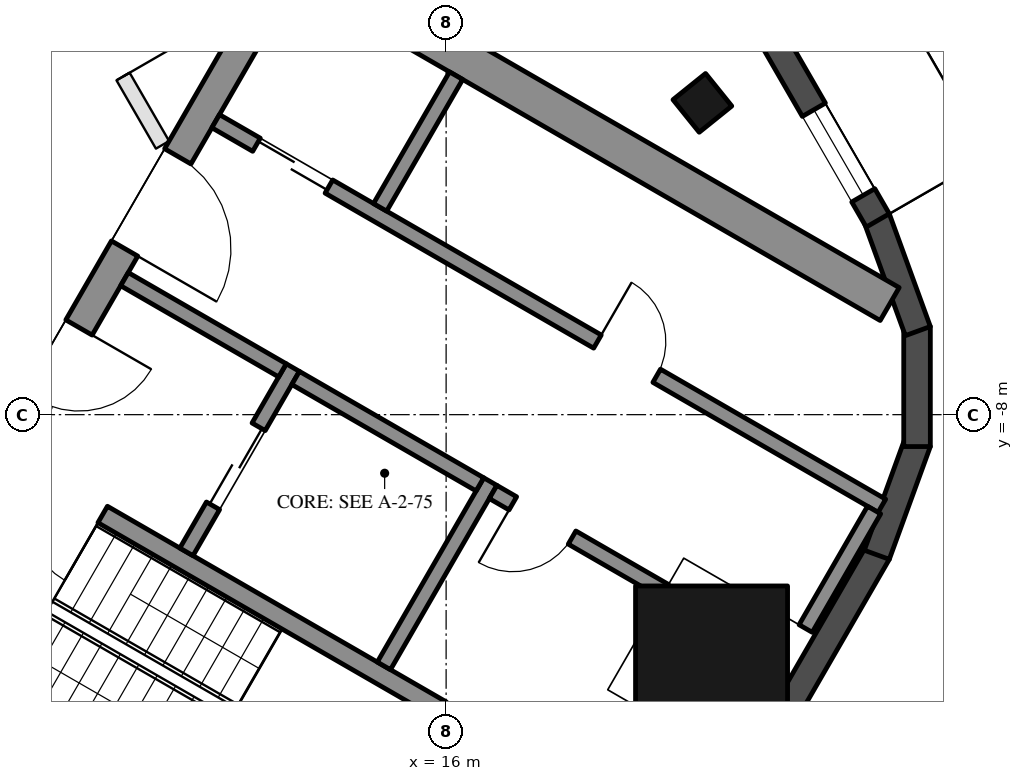
"""IFC4 building model, lengths in metres.
Left out: names, types, materials, properties, quantities, classifications, styles, units other than length and angle.
Written with IfcOpenShell. Run it as: python <this file> out.ifc"""

import sys

from ifc_helpers import new_model, si_unit, direction, frame, frame_2d, origin, origin_2d, place, context, subcontext, project, spatial, rectangle, hollow_rectangle, extrude, boolean, halfspace, element, fill, save


model = new_model("IFC4")
c1 = context("Model", 3, precision=1e-05, world=origin(), true_north=direction((0.0, 1.0)))
c2 = subcontext(c1, "Body", "Model", "MODEL_VIEW")
j1 = project(units=[si_unit("LENGTHUNIT", "METRE"), si_unit("PLANEANGLEUNIT", "RADIAN")], contexts=[c1])
p1 = place(None, origin())
s1 = spatial("IfcSite", under=j1, at=p1, CompositionType="ELEMENT")
p2 = place(p1, origin())
s2 = spatial("IfcBuilding", under=s1, at=p2, CompositionType="ELEMENT")
p3 = place(p2, frame((0.0, 0.0, 320.7)))
s3 = spatial("IfcBuildingStorey", under=s2, at=p3, CompositionType="ELEMENT", Elevation=320.7)
p4 = place(p3, frame((19.372, -3.898, 0.0), z_axis=(-0.190735471498, 0.029652697198, 0.981193506634), x_axis=(0.48820144503, -0.864299133312, 0.121022135277)))
e1 = element("IfcColumn", 1, at=p4, inside=s3, PredefinedType="COLUMN", context=c2, shape_type="SweptSolid", body=[
    boolean("DIFFERENCE", boolean("DIFFERENCE", extrude(hollow_rectangle(XDim=0.55, YDim=0.55, WallThickness=0.025, at=origin_2d()), origin(), (0.0, 0.0, 1.0), 3.771), halfspace(frame((0.0, 0.0, 0.04), z_axis=(0.0, 0.0, 1.0), x_axis=(1.0, 0.0, 0.0)), True)), halfspace(frame((0.0, 0.0, 3.731), z_axis=(0.0, 0.0, 1.0), x_axis=(1.0, 0.0, 0.0)), False)),
])
p5 = place(p3, frame((19.492, -11.254, 0.0), z_axis=(-0.190406849863, 0.109944185114, 0.975529347424), x_axis=(0.500043453909, 0.866000314205, 0.0)))
e2 = element("IfcColumn", 2, at=p5, inside=s3, PredefinedType="COLUMN", context=c2, shape_type="SweptSolid", body=[
    boolean("DIFFERENCE", boolean("DIFFERENCE", extrude(hollow_rectangle(XDim=2.0, YDim=2.0, WallThickness=0.05, at=origin_2d()), origin(), (0.0, 0.0, 1.0), 3.793), halfspace(frame((0.0, 0.0, 0.113), z_axis=(0.0, 0.0, 1.0), x_axis=(1.0, 0.0, 0.0)), True)), halfspace(frame((0.0, 0.0, 3.679), z_axis=(0.0, 0.0, 1.0), x_axis=(1.0, 0.0, 0.0)), False)),
])
p6 = place(p3, frame((19.34, -13.867, 0.0), z_axis=(0.0, 0.0, 1.0), x_axis=(0.500023656998, 0.86601174498, 0.0)))
e3 = element("IfcWall", 3, at=p6, inside=s3, PredefinedType="SOLIDWALL", context=c2, shape_type="SweptSolid", body=[
    extrude(rectangle(XDim=4.677, YDim=0.35, at=frame_2d((2.339, 0.0))), origin(), (0.0, 0.0, 1.0), 3.55),
])
for number, where, z_axis, x_axis in (
    (4, (21.666, -9.844, 0.0), (0.0, 0.0, 1.0), (0.342, 0.94, 0.0)),
    (5, (22.196, -8.42, 0.0), (0.0, 0.0, 1.0), (0.0, 1.0, 0.0)),
    (6, (22.206, -6.9, 0.0), (0.0, 0.0, 1.0), (-0.342, 0.94, 0.0)),
):
    element("IfcWall", number, at=place(p3, frame(where, z_axis=z_axis, x_axis=x_axis)), inside=s3, PredefinedType="SOLIDWALL", context=c2, shape_type="SweptSolid", body=[
        extrude(rectangle(XDim=1.579, YDim=0.35, at=frame_2d((0.79, 0.0))), origin(), (0.0, 0.0, 1.0), 3.55),
    ])
p7 = place(p3, frame((21.679, -5.444, 0.0), z_axis=(0.0, 0.0, 1.0), x_axis=(-0.500020587865, 0.866013517049, 0.0)))
e7 = element("IfcWall", 7, at=p7, inside=s3, PredefinedType="SOLIDWALL", context=c2, shape_type="SweptSolid", body=[
    extrude(rectangle(XDim=9.924, YDim=0.35, at=frame_2d((4.962, 0.0))), origin(), (0.0, 0.0, 1.0), 3.55),
])
p8 = place(p7, frame((0.381, 0.0, 0.3)))
e8 = element("IfcOpeningElement", 8, at=p8, cuts=e7, PredefinedType="OPENING", context=c2, shape_type="SweptSolid", body=[
    extrude(rectangle(XDim=1.3, YDim=2.65, at=frame_2d((0.65, 1.325))), frame((0.0, 0.185, 0.0), z_axis=(0.0, -1.0, 0.0), x_axis=(1.0, 0.0, 0.0)), (0.0, 0.0, 1.0), 0.37),
])
p9 = place(p7, frame((5.995, 0.0, 0.0)))
e9 = element("IfcOpeningElement", 9, at=p9, cuts=e7, PredefinedType="OPENING", context=c2, shape_type="SweptSolid", body=[
    extrude(rectangle(XDim=2.4, YDim=2.4, at=frame_2d((1.2, 1.2))), frame((0.0, 0.185, 0.0), z_axis=(0.0, -1.0, 0.0), x_axis=(1.0, 0.0, 0.0)), (0.0, 0.0, 1.0), 0.37),
])
p10 = place(p7, frame((3.579, 0.0, 0.3)))
e10 = element("IfcOpeningElement", 10, at=p10, cuts=e7, PredefinedType="OPENING", context=c2, shape_type="SweptSolid", body=[
    extrude(rectangle(XDim=2.1, YDim=2.65, at=frame_2d((1.05, 1.325))), frame((0.0, 0.185, 0.0), z_axis=(0.0, -1.0, 0.0), x_axis=(1.0, 0.0, 0.0)), (0.0, 0.0, 1.0), 0.37),
])
for number, where, z_axis, x_axis in (
    (11, (8.547, -10.997, 0.0), (0.0, 0.0, 1.0), (0.866, -0.5, 0.0)),
    (12, (13.797, -1.903, 0.0), (0.0, 0.0, 1.0), (0.866, -0.5, 0.0)),
):
    element("IfcWall", number, at=place(p3, frame(where, z_axis=z_axis, x_axis=x_axis)), inside=s3, PredefinedType="SHEAR", context=c2, shape_type="SweptSolid", body=[
        extrude(rectangle(XDim=9.283, YDim=0.5, at=frame_2d((4.641, 0.0))), origin(), (0.0, 0.0, 1.0), 3.5),
    ])
p11 = place(p3, frame((8.845, -10.88, 0.0), z_axis=(0.0, 0.0, 1.0), x_axis=(0.500004234368, 0.866022959057, 0.0)))
e13 = element("IfcWall", 13, at=p11, inside=s3, PredefinedType="SHEAR", context=c2, shape_type="SweptSolid", body=[
    extrude(rectangle(XDim=10.0, YDim=0.4, at=frame_2d((5.0, 0.0))), origin(), (0.0, 0.0, 1.0), 3.5),
])
p12 = place(p11, frame((3.55, 0.0, 0.0)))
e14 = element("IfcOpeningElement", 14, at=p12, cuts=e13, PredefinedType="OPENING", context=c2, shape_type="SweptSolid", body=[
    extrude(rectangle(XDim=1.1, YDim=2.1, at=frame_2d((0.55, 1.05))), frame((0.0, 0.21, 0.0), z_axis=(0.0, -1.0, 0.0), x_axis=(1.0, 0.0, 0.0)), (0.0, 0.0, 1.0), 0.42),
])
p13 = place(p11, frame((5.85, 0.0, 0.0)))
e15 = element("IfcOpeningElement", 15, at=p13, cuts=e13, PredefinedType="OPENING", context=c2, shape_type="SweptSolid", body=[
    extrude(rectangle(XDim=1.4, YDim=2.1, at=frame_2d((0.7, 1.05))), frame((0.0, 0.21, 0.0), z_axis=(0.0, -1.0, 0.0), x_axis=(1.0, 0.0, 0.0)), (0.0, 0.0, 1.0), 0.42),
])
p14 = place(p3, frame((10.356, -8.664, 0.0), z_axis=(0.0, 0.0, 1.0), x_axis=(0.866028629588, -0.499994412703, 0.0)))
e16 = element("IfcWall", 16, at=p14, inside=s3, PredefinedType="SHEAR", context=c2, shape_type="SweptSolid", body=[
    extrude(rectangle(XDim=6.45, YDim=0.25, at=frame_2d((3.225, 0.0))), origin(), (0.0, 0.0, 1.0), 3.5),
])
p15 = place(p14, frame((0.3, 0.0, 0.0)))
e17 = element("IfcOpeningElement", 17, at=p15, cuts=e16, PredefinedType="OPENING", context=c2, shape_type="SweptSolid", body=[
    extrude(rectangle(XDim=1.0, YDim=2.1, at=frame_2d((0.5, 1.05))), frame((0.0, 0.135, 0.0), z_axis=(0.0, -1.0, 0.0), x_axis=(1.0, 0.0, 0.0)), (0.0, 0.0, 1.0), 0.27),
])
p16 = place(p3, frame((15.181, -11.305, 0.0), z_axis=(0.0, 0.0, 1.0), x_axis=(0.49994636267, 0.866056369097, 0.0)))
e18 = element("IfcWall", 18, at=p16, inside=s3, PredefinedType="SHEAR", context=c2, shape_type="SweptSolid", body=[
    extrude(rectangle(XDim=2.8, YDim=0.2, at=frame_2d((1.4, 0.0))), origin(), (0.0, 0.0, 1.0), 3.5),
])
p17 = place(p3, frame((12.583, -9.805, 0.0), z_axis=(0.0, 0.0, 1.0), x_axis=(0.49994636267, 0.866056369097, 0.0)))
e19 = element("IfcWall", 19, at=p17, inside=s3, PredefinedType="SHEAR", context=c2, shape_type="SweptSolid", body=[
    extrude(rectangle(XDim=2.8, YDim=0.2, at=frame_2d((1.4, 0.0))), origin(), (0.0, 0.0, 1.0), 3.5),
])
p18 = place(p17, frame((0.7, 0.0, 0.0)))
e20 = element("IfcOpeningElement", 20, at=p18, cuts=e19, PredefinedType="OPENING", context=c2, shape_type="SweptSolid", body=[
    extrude(rectangle(XDim=1.2, YDim=2.1, at=frame_2d((0.6, 1.05))), frame((0.0, 0.11, 0.0), z_axis=(0.0, -1.0, 0.0), x_axis=(1.0, 0.0, 0.0)), (0.0, 0.0, 1.0), 0.22),
])
p19 = place(p3, frame((11.768, -6.217, 0.0), z_axis=(0.0, 0.0, 1.0), x_axis=(0.866050077142, -0.499957262057, 0.0)))
e21 = element("IfcWall", 21, at=p19, inside=s3, PredefinedType="SHEAR", context=c2, shape_type="SweptSolid", body=[
    extrude(rectangle(XDim=2.4, YDim=0.2, at=frame_2d((1.2, 0.0))), origin(), (0.0, 0.0, 1.0), 3.5),
])
p20 = place(p3, frame((14.02, -7.517, 0.0), z_axis=(0.0, 0.0, 1.0), x_axis=(0.866034573852, -0.49998411664, 0.0)))
e22 = element("IfcWall", 22, at=p20, inside=s3, PredefinedType="SHEAR", context=c2, shape_type="SweptSolid", body=[
    extrude(rectangle(XDim=2.8, YDim=0.2, at=frame_2d((1.4, 0.0))), origin(), (0.0, 0.0, 1.0), 3.5),
])
p21 = place(p3, frame((12.968, -4.138, 0.0), z_axis=(0.0, 0.0, 1.0), x_axis=(0.866025710499, -0.499999468754, 0.0)))
e23 = element("IfcWall", 23, at=p21, inside=s3, PredefinedType="SHEAR", context=c2, shape_type="SweptSolid", body=[
    extrude(rectangle(XDim=10.121, YDim=0.2, at=frame_2d((5.061, 0.0))), origin(), (0.0, 0.0, 1.0), 3.5),
])
p22 = place(p21, frame((0.62, 0.0, 0.0)))
e24 = element("IfcOpeningElement", 24, at=p22, cuts=e23, PredefinedType="OPENING", context=c2, shape_type="SweptSolid", body=[
    extrude(rectangle(XDim=1.1, YDim=2.1, at=frame_2d((0.55, 1.05))), frame((0.0, 0.11, 0.0), z_axis=(0.0, -1.0, 0.0), x_axis=(1.0, 0.0, 0.0)), (0.0, 0.0, 1.0), 0.22),
])
p23 = place(p21, frame((5.8, 0.0, 0.0)))
e25 = element("IfcOpeningElement", 25, at=p23, cuts=e23, PredefinedType="OPENING", context=c2, shape_type="SweptSolid", body=[
    extrude(rectangle(XDim=0.9, YDim=2.1, at=frame_2d((0.45, 1.05))), frame((0.0, 0.11, 0.0), z_axis=(0.0, -1.0, 0.0), x_axis=(1.0, 0.0, 0.0)), (0.0, 0.0, 1.0), 0.22),
])
p24 = place(p3, frame((20.73, -10.814, 0.0), z_axis=(0.0, 0.0, 1.0), x_axis=(0.499961193289, 0.866047807691, 0.0)))
e26 = element("IfcWall", 26, at=p24, inside=s3, PredefinedType="SHEAR", context=c2, shape_type="SweptSolid", body=[
    extrude(rectangle(XDim=1.8, YDim=0.2, at=frame_2d((0.9, 0.0))), origin(), (0.0, 0.0, 1.0), 3.5),
])
p25 = place(p3, frame((16.618, -9.017, 0.0), z_axis=(0.0, 0.0, 1.0), x_axis=(0.866045268016, -0.499965592563, 0.0)))
e27 = element("IfcWall", 27, at=p25, inside=s3, PredefinedType="SHEAR", context=c2, shape_type="SweptSolid", body=[
    extrude(rectangle(XDim=2.608, YDim=0.2, at=frame_2d((1.304, 0.0))), origin(), (0.0, 0.0, 1.0), 3.5),
])
p26 = place(p25, frame((0.3, 0.0, 0.0)))
e28 = element("IfcOpeningElement", 28, at=p26, cuts=e27, PredefinedType="OPENING", context=c2, shape_type="SweptSolid", body=[
    extrude(rectangle(XDim=0.9, YDim=2.1, at=frame_2d((0.45, 1.05))), frame((0.0, 0.11, 0.0), z_axis=(0.0, -1.0, 0.0), x_axis=(1.0, 0.0, 0.0)), (0.0, 0.0, 1.0), 0.22),
])
p27 = place(p3, frame((15.131, -5.272, 0.0), z_axis=(0.0, 0.0, 1.0), x_axis=(0.499972520799, 0.866041268327, 0.0)))
e29 = element("IfcWall", 29, at=p27, inside=s3, PredefinedType="SHEAR", context=c2, shape_type="SweptSolid", body=[
    extrude(rectangle(XDim=2.0, YDim=0.2, at=frame_2d((1.0, 0.0))), origin(), (0.0, 0.0, 1.0), 3.5),
])
p28 = place(p3, frame((10.025, -0.563, 0.0), z_axis=(0.0, 0.0, 1.0), x_axis=(0.500000259638, -0.866025253883, 0.0)))
e30 = element("IfcWall", 30, at=p28, inside=s3, PredefinedType="PARTITIONING", context=c2, shape_type="SweptSolid", body=[
    extrude(rectangle(XDim=4.488, YDim=0.2, at=frame_2d((2.244, 0.0))), origin(), (0.0, 0.0, 1.0), 3.15),
])
p29 = place(p28, frame((2.45, 0.0, 0.0)))
e31 = element("IfcOpeningElement", 31, at=p29, cuts=e30, PredefinedType="OPENING", context=c2, shape_type="SweptSolid", body=[
    extrude(rectangle(XDim=1.0, YDim=2.1, at=frame_2d((0.5, 1.05))), frame((0.0, 0.11, 0.0), z_axis=(0.0, -1.0, 0.0), x_axis=(1.0, 0.0, 0.0)), (0.0, 0.0, 1.0), 0.22),
])
p30 = place(p8, origin())
e32 = element("IfcWindow", 32, at=p30, inside=s3, PartitioningType="SINGLE_PANEL", PredefinedType="WINDOW", context=c2, shape_type="SweptSolid", body=[
    extrude(rectangle(XDim=1.3, YDim=2.65, at=frame_2d((0.65, 1.325))), frame((0.0, 0.03, 0.0), z_axis=(0.0, -1.0, 0.0), x_axis=(1.0, 0.0, 0.0)), (0.0, 0.0, 1.0), 0.06),
])
fill(e8, e32)
p31 = place(p18, origin())
e33 = element("IfcDoor", 33, at=p31, inside=s3, OperationType="DOUBLE_DOOR_SLIDING", PredefinedType="DOOR", context=c2, shape_type="SweptSolid", body=[
    extrude(rectangle(XDim=1.2, YDim=2.1, at=frame_2d((0.6, 1.05))), frame((0.0, 0.025, 0.0), z_axis=(0.0, -1.0, 0.0), x_axis=(1.0, 0.0, 0.0)), (0.0, 0.0, 1.0), 0.05),
])
fill(e20, e33)
p32 = place(p22, origin())
e34 = element("IfcDoor", 34, at=p32, inside=s3, OperationType="DOUBLE_DOOR_SLIDING", PredefinedType="DOOR", context=c2, shape_type="SweptSolid", body=[
    extrude(rectangle(XDim=1.1, YDim=2.1, at=frame_2d((0.55, 1.05))), frame((0.0, 0.025, 0.0), z_axis=(0.0, -1.0, 0.0), x_axis=(1.0, 0.0, 0.0)), (0.0, 0.0, 1.0), 0.05),
])
fill(e24, e34)
p33 = place(p23, origin())
e35 = element("IfcDoor", 35, at=p33, inside=s3, OperationType="SINGLE_SWING_LEFT", PredefinedType="DOOR", context=c2, shape_type="SweptSolid", body=[
    extrude(rectangle(XDim=0.9, YDim=2.1, at=frame_2d((0.45, 1.05))), frame((0.0, 0.025, 0.0), z_axis=(0.0, -1.0, 0.0), x_axis=(1.0, 0.0, 0.0)), (0.0, 0.0, 1.0), 0.05),
])
fill(e25, e35)
p34 = place(p26, frame((0.9, 0.0, 0.0), z_axis=(0.0, 0.0, 1.0), x_axis=(-1.0, 0.0, 0.0)))
e36 = element("IfcDoor", 36, at=p34, inside=s3, OperationType="SINGLE_SWING_RIGHT", PredefinedType="DOOR", context=c2, shape_type="SweptSolid", body=[
    extrude(rectangle(XDim=0.9, YDim=2.1, at=frame_2d((0.45, 1.05))), frame((0.0, 0.025, 0.0), z_axis=(0.0, -1.0, 0.0), x_axis=(1.0, 0.0, 0.0)), (0.0, 0.0, 1.0), 0.05),
])
fill(e28, e36)
p35 = place(p12, frame((1.1, 0.0, 0.0), z_axis=(0.0, 0.0, 1.0), x_axis=(-1.0, 0.0, 0.0)))
e37 = element("IfcDoor", 37, at=p35, inside=s3, OperationType="SINGLE_SWING_LEFT", PredefinedType="DOOR", context=c2, shape_type="SweptSolid", body=[
    extrude(rectangle(XDim=1.1, YDim=2.1, at=frame_2d((0.55, 1.05))), frame((0.0, 0.025, 0.0), z_axis=(0.0, -1.0, 0.0), x_axis=(1.0, 0.0, 0.0)), (0.0, 0.0, 1.0), 0.05),
])
fill(e14, e37)
p36 = place(p13, frame((1.4, 0.0, 0.0), z_axis=(0.0, 0.0, 1.0), x_axis=(-1.0, 0.0, 0.0)))
e38 = element("IfcDoor", 38, at=p36, inside=s3, OperationType="DOUBLE_DOOR_SINGLE_SWING", PredefinedType="DOOR", context=c2, shape_type="SweptSolid", body=[
    extrude(rectangle(XDim=1.4, YDim=2.1, at=frame_2d((0.7, 1.05))), frame((0.0, 0.025, 0.0), z_axis=(0.0, -1.0, 0.0), x_axis=(1.0, 0.0, 0.0)), (0.0, 0.0, 1.0), 0.05),
])
fill(e15, e38)
p37 = place(p15, frame((1.0, 0.0, 0.0), z_axis=(0.0, 0.0, 1.0), x_axis=(-1.0, 0.0, 0.0)))
e39 = element("IfcDoor", 39, at=p37, inside=s3, OperationType="SINGLE_SWING_LEFT", PredefinedType="DOOR", context=c2, shape_type="SweptSolid", body=[
    extrude(rectangle(XDim=1.0, YDim=2.1, at=frame_2d((0.5, 1.05))), frame((0.0, 0.025, 0.0), z_axis=(0.0, -1.0, 0.0), x_axis=(1.0, 0.0, 0.0)), (0.0, 0.0, 1.0), 0.05),
])
fill(e17, e39)
p38 = place(p29, origin())
e40 = element("IfcDoor", 40, at=p38, inside=s3, OperationType="SINGLE_SWING_RIGHT", PredefinedType="DOOR", context=c2, shape_type="SweptSolid", body=[
    extrude(rectangle(XDim=1.0, YDim=2.1, at=frame_2d((0.5, 1.05))), frame((0.0, 0.025, 0.0), z_axis=(0.0, -1.0, 0.0), x_axis=(1.0, 0.0, 0.0)), (0.0, 0.0, 1.0), 0.05),
])
fill(e31, e40)
save(model, sys.argv[1])
